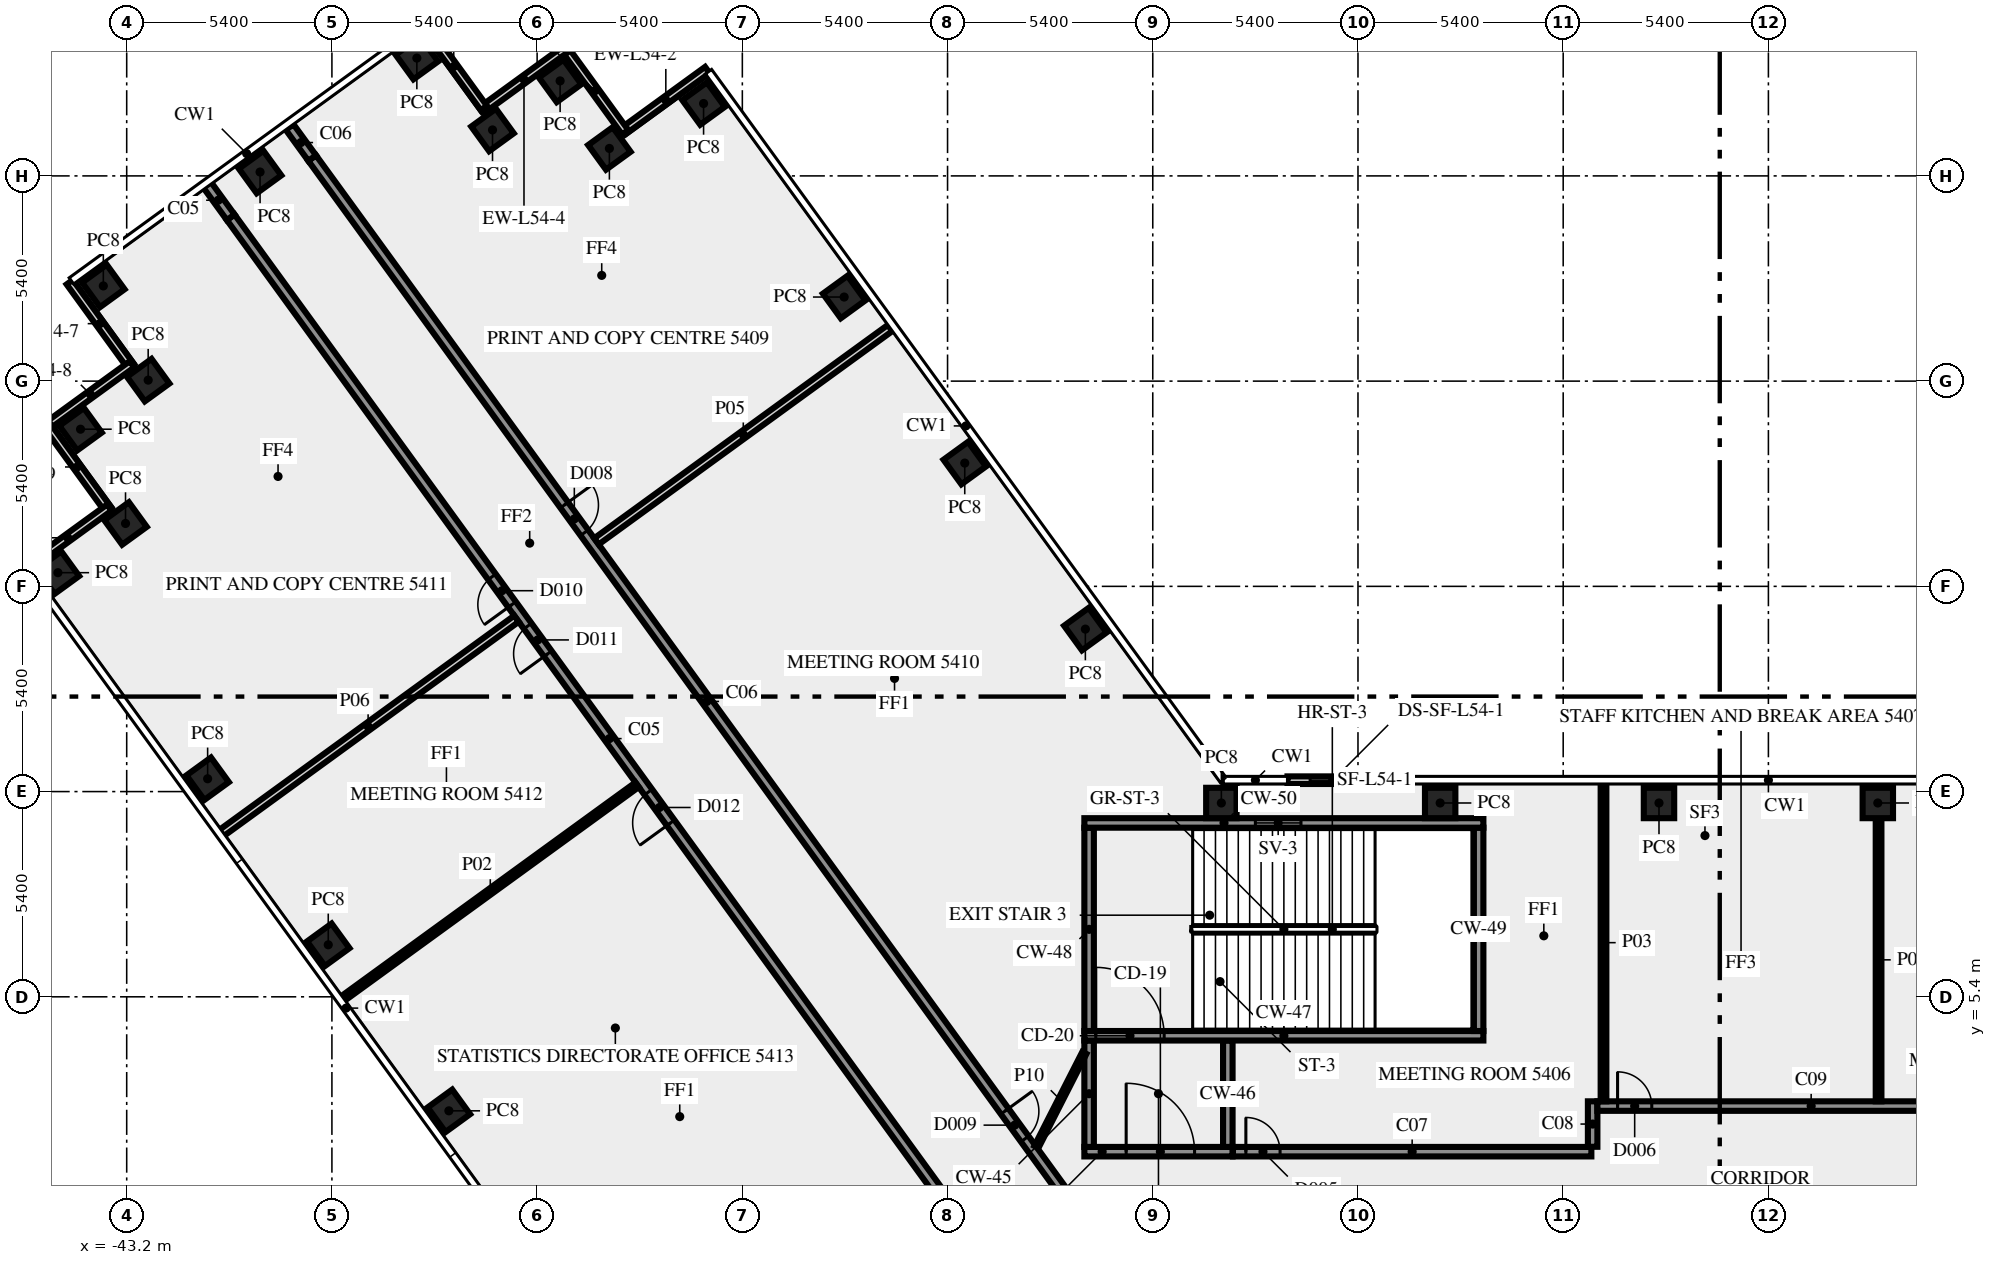
"""IFC4 building model, lengths in metres.
Left out: names, types, materials, properties, quantities, classifications, styles, units other than length and angle.
Written with IfcOpenShell. Run it as: python <this file> out.ifc"""

import sys

from ifc_helpers import new_model, si_unit, direction, frame, frame_2d, origin, origin_2d, place, context, subcontext, project, spatial, rectangle, extrude, element, fill, save


model = new_model("IFC4")
c1 = context("Model", 3, precision=1e-05, world=origin(), true_north=direction((0.0, 1.0)))
c2 = subcontext(c1, "Body", "Model", "MODEL_VIEW")
j1 = project(units=[si_unit("LENGTHUNIT", "METRE"), si_unit("PLANEANGLEUNIT", "RADIAN")], contexts=[c1])
p1 = place(None, origin())
s1 = spatial("IfcSite", under=j1, at=p1, CompositionType="ELEMENT")
p2 = place(p1, origin())
s2 = spatial("IfcBuilding", under=s1, at=p2, CompositionType="ELEMENT")
p3 = place(p2, frame((0.0, 0.0, 230.0)))
s3 = spatial("IfcBuildingStorey", under=s2, at=p3, CompositionType="ELEMENT", Elevation=230.0)
for number, where, z_axis, x_axis in (
    (1, (-17.974, 15.075, 0.0), (0.0, 0.0, 1.0), (-0.588, 0.809, 0.0)),
    (2, (-21.147, 19.444, 0.0), (0.0, 0.0, 1.0), (-0.588, 0.809, 0.0)),
    (3, (-24.321, 23.812, 0.0), (0.0, 0.0, 1.0), (-0.588, 0.809, 0.0)),
    (4, (-28.02, 28.905, 0.0), (0.0, 0.0, 1.0), (-0.809, -0.588, 0.0)),
    (5, (-30.499, 27.723, 0.0), (0.0, 0.0, 1.0), (-0.809, -0.588, 0.0)),
    (6, (-31.795, 29.5, 0.0), (0.0, 0.0, 1.0), (-0.588, 0.809, 0.0)),
    (7, (-33.574, 28.209, 0.0), (0.0, 0.0, 1.0), (-0.588, 0.809, 0.0)),
    (8, (-35.565, 30.1, 0.0), (0.0, 0.0, 1.0), (-0.809, -0.588, 0.0)),
    (9, (-39.691, 27.102, 0.0), (0.0, 0.0, 1.0), (-0.809, -0.588, 0.0)),
    (10, (-43.815, 24.105, 0.0), (0.0, 0.0, 1.0), (-0.809, -0.588, 0.0)),
    (11, (-42.635, 21.626, 0.0), (0.0, 0.0, 1.0), (-0.809, -0.588, 0.0)),
    (12, (-44.415, 20.335, 0.0), (0.0, 0.0, 1.0), (0.588, -0.809, 0.0)),
    (13, (-43.231, 17.854, 0.0), (0.0, 0.0, 1.0), (0.588, -0.809, 0.0)),
    (14, (-45.01, 16.56, 0.0), (0.0, 0.0, 1.0), (0.588, -0.809, 0.0)),
    (15, (-41.07, 11.137, 0.0), (0.0, 0.0, 1.0), (0.588, -0.809, 0.0)),
    (16, (-37.896, 6.769, 0.0), (0.0, 0.0, 1.0), (0.588, -0.809, 0.0)),
    (17, (-34.722, 2.4, 0.0), (0.0, 0.0, 1.0), (0.588, -0.809, 0.0)),
    (18, (2.879, 10.5, 0.0), (0.0, 0.0, 1.0), (-1.0, 0.0, 0.0)),
    (19, (-2.879, 10.5, 0.0), (0.0, 0.0, 1.0), (-1.0, 0.0, 0.0)),
    (20, (-8.637, 10.5, 0.0), (0.0, 0.0, 1.0), (-1.0, 0.0, 0.0)),
    (21, (-14.395, 10.5, 0.0), (0.0, 0.0, 1.0), (-1.0, 0.0, 0.0)),
):
    element("IfcColumn", number, at=place(p3, frame(where, z_axis=z_axis, x_axis=x_axis)), inside=s3, PredefinedType="COLUMN", context=c2, shape_type="SweptSolid", body=[
        extrude(rectangle(XDim=0.8, YDim=0.8, at=origin_2d()), origin(), (0.0, 0.0, 1.0), 3.65),
    ])
for number, where, z_axis, x_axis in (
    (22, (-27.921, 29.787, 0.0), (0.0, 0.0, 1.0), (-0.809, -0.588, 0.0)),
    (23, (-30.083, 28.149, 0.0), (0.0, 0.0, 1.0), (-0.588, 0.809, 0.0)),
    (24, (-31.654, 30.331, 0.0), (0.0, 0.0, 1.0), (-0.809, -0.588, 0.0)),
    (25, (-33.801, 28.786, 0.0), (0.0, 0.0, 1.0), (-0.588, 0.809, 0.0)),
    (26, (-44.699, 24.205, 0.0), (0.0, 0.0, 1.0), (0.588, -0.809, 0.0)),
    (27, (-43.061, 22.043, 0.0), (0.0, 0.0, 1.0), (-0.809, -0.588, 0.0)),
    (28, (-45.296, 20.434, 0.0), (0.0, 0.0, 1.0), (0.588, -0.809, 0.0)),
    (29, (-43.658, 18.272, 0.0), (0.0, 0.0, 1.0), (-0.809, -0.588, 0.0)),
):
    element("IfcWall", number, at=place(p3, frame(where, z_axis=z_axis, x_axis=x_axis)), inside=s3, PredefinedType="SOLIDWALL", context=c2, shape_type="SweptSolid", body=[
        extrude(rectangle(XDim=2.7, YDim=0.2, at=frame_2d((1.35, 0.0))), origin(), (0.0, 0.0, 1.0), 3.65),
    ])
p4 = place(p3, frame((-10.263, 11.1, 0.0), z_axis=(0.0, 0.0, 1.0), x_axis=(-1.0, 0.0, 0.0)))
e30 = element("IfcWall", 30, at=p4, inside=s3, PredefinedType="SOLIDWALL", context=c2, shape_type="SweptSolid", body=[
    extrude(rectangle(XDim=2.392, YDim=0.2, at=frame_2d((1.196, 0.0))), origin(), (0.0, 0.0, 1.0), 3.65),
])
p5 = place(p4, frame((0.596, 0.0, 1.0)))
e31 = element("IfcOpeningElement", 31, at=p5, cuts=e30, PredefinedType="OPENING", context=c2, shape_type="SweptSolid", body=[
    extrude(rectangle(XDim=1.2, YDim=1.2, at=frame_2d((0.6, 0.6))), frame((0.0, 0.11, 0.0), z_axis=(0.0, -1.0, 0.0), x_axis=(1.0, 0.0, 0.0)), (0.0, 0.0, 1.0), 0.22),
])
p6 = place(p3, frame((-18.0, 1.325, 0.0), z_axis=(0.0, 0.0, 1.0), x_axis=(1.0, 0.0, 0.0)))
e32 = element("IfcWall", 32, at=p6, inside=s3, PredefinedType="SHEAR", context=c2, shape_type="SweptSolid", body=[
    extrude(rectangle(XDim=3.9, YDim=0.25, at=frame_2d((1.95, 0.0))), origin(), (0.0, 0.0, 1.0), 3.65),
])
p7 = place(p6, frame((1.1, 0.0, 0.0)))
e33 = element("IfcOpeningElement", 33, at=p7, cuts=e32, PredefinedType="OPENING", context=c2, shape_type="SweptSolid", body=[
    extrude(rectangle(XDim=1.8, YDim=2.1, at=frame_2d((0.9, 1.05))), frame((0.0, 0.135, 0.0), z_axis=(0.0, -1.0, 0.0), x_axis=(1.0, 0.0, 0.0)), (0.0, 0.0, 1.0), 0.27),
])
for number, where, z_axis, x_axis in (
    (34, (-17.875, 1.45, 0.0), (0.0, 0.0, 1.0), (0.0, 1.0, 0.0)),
    (35, (-14.225, 1.45, 0.0), (0.0, 0.0, 1.0), (0.0, 1.0, 0.0)),
):
    element("IfcWall", number, at=place(p3, frame(where, z_axis=z_axis, x_axis=x_axis)), inside=s3, PredefinedType="SHEAR", context=c2, shape_type="SweptSolid", body=[
        extrude(rectangle(XDim=2.8, YDim=0.25, at=frame_2d((1.4, 0.0))), origin(), (0.0, 0.0, 1.0), 3.65),
    ])
p8 = place(p3, frame((-18.0, 4.375, 0.0), z_axis=(0.0, 0.0, 1.0), x_axis=(1.0, 0.0, 0.0)))
e36 = element("IfcWall", 36, at=p8, inside=s3, PredefinedType="SHEAR", context=c2, shape_type="SweptSolid", body=[
    extrude(rectangle(XDim=10.5, YDim=0.25, at=frame_2d((5.25, 0.0))), origin(), (0.0, 0.0, 1.0), 3.65),
])
p9 = place(p8, frame((0.3, 0.0, 0.0)))
e37 = element("IfcOpeningElement", 37, at=p9, cuts=e36, PredefinedType="OPENING", context=c2, shape_type="SweptSolid", body=[
    extrude(rectangle(XDim=1.8, YDim=2.1, at=frame_2d((0.9, 1.05))), frame((0.0, 0.135, 0.0), z_axis=(0.0, -1.0, 0.0), x_axis=(1.0, 0.0, 0.0)), (0.0, 0.0, 1.0), 0.27),
])
for number, where, z_axis, x_axis in (
    (38, (-17.875, 4.5, 0.0), (0.0, 0.0, 1.0), (0.0, 1.0, 0.0)),
    (39, (-7.625, 4.5, 0.0), (0.0, 0.0, 1.0), (0.0, 1.0, 0.0)),
):
    element("IfcWall", number, at=place(p3, frame(where, z_axis=z_axis, x_axis=x_axis)), inside=s3, PredefinedType="SHEAR", context=c2, shape_type="SweptSolid", body=[
        extrude(rectangle(XDim=5.35, YDim=0.25, at=frame_2d((2.675, 0.0))), origin(), (0.0, 0.0, 1.0), 3.65),
    ])
p10 = place(p3, frame((-18.0, 9.975, 0.0), z_axis=(0.0, 0.0, 1.0), x_axis=(1.0, 0.0, 0.0)))
e40 = element("IfcWall", 40, at=p10, inside=s3, PredefinedType="SHEAR", context=c2, shape_type="SweptSolid", body=[
    extrude(rectangle(XDim=10.5, YDim=0.25, at=frame_2d((5.25, 0.0))), origin(), (0.0, 0.0, 1.0), 3.65),
])
p11 = place(p10, frame((4.5, 0.0, 1.0)))
e41 = element("IfcOpeningElement", 41, at=p11, cuts=e40, PredefinedType="OPENING", context=c2, shape_type="SweptSolid", body=[
    extrude(rectangle(XDim=1.2, YDim=1.2, at=frame_2d((0.6, 0.6))), frame((0.0, 0.135, 0.0), z_axis=(0.0, -1.0, 0.0), x_axis=(1.0, 0.0, 0.0)), (0.0, 0.0, 1.0), 0.27),
])
p12 = place(p3, frame((-20.531, -1.523, 0.0), z_axis=(0.0, 0.0, 1.0), x_axis=(-0.587781654618, 0.809019608226, 0.0)))
e42 = element("IfcWall", 42, at=p12, inside=s3, PredefinedType="SOLIDWALL", context=c2, shape_type="SweptSolid", body=[
    extrude(rectangle(XDim=33.911, YDim=0.25, at=frame_2d((16.956, 0.0))), origin(), (0.0, 0.0, 1.0), 3.65),
])
p13 = place(p12, frame((14.216, 0.0, 0.0)))
e43 = element("IfcOpeningElement", 43, at=p13, cuts=e42, PredefinedType="OPENING", context=c2, shape_type="SweptSolid", body=[
    extrude(rectangle(XDim=1.0, YDim=2.1, at=frame_2d((0.5, 1.05))), frame((0.0, 0.135, 0.0), z_axis=(0.0, -1.0, 0.0), x_axis=(1.0, 0.0, 0.0)), (0.0, 0.0, 1.0), 0.27),
])
p14 = place(p12, frame((19.715, 0.0, 0.0)))
e44 = element("IfcOpeningElement", 44, at=p14, cuts=e42, PredefinedType="OPENING", context=c2, shape_type="SweptSolid", body=[
    extrude(rectangle(XDim=0.9, YDim=2.1, at=frame_2d((0.45, 1.05))), frame((0.0, 0.135, 0.0), z_axis=(0.0, -1.0, 0.0), x_axis=(1.0, 0.0, 0.0)), (0.0, 0.0, 1.0), 0.27),
])
p15 = place(p12, frame((21.316, 0.0, 0.0)))
e45 = element("IfcOpeningElement", 45, at=p15, cuts=e42, PredefinedType="OPENING", context=c2, shape_type="SweptSolid", body=[
    extrude(rectangle(XDim=0.9, YDim=2.1, at=frame_2d((0.45, 1.05))), frame((0.0, 0.135, 0.0), z_axis=(0.0, -1.0, 0.0), x_axis=(1.0, 0.0, 0.0)), (0.0, 0.0, 1.0), 0.27),
])
p16 = place(p3, frame((-38.32, 27.469, 0.0), z_axis=(0.0, 0.0, 1.0), x_axis=(0.587788021768, -0.809014982226, 0.0)))
e46 = element("IfcWall", 46, at=p16, inside=s3, PredefinedType="SOLIDWALL", context=c2, shape_type="SweptSolid", body=[
    extrude(rectangle(XDim=35.344, YDim=0.25, at=frame_2d((17.672, 0.0))), origin(), (0.0, 0.0, 1.0), 3.65),
])
p17 = place(p16, frame((31.003, 0.0, 0.0)))
e47 = element("IfcOpeningElement", 47, at=p17, cuts=e46, PredefinedType="OPENING", context=c2, shape_type="SweptSolid", body=[
    extrude(rectangle(XDim=0.9, YDim=2.1, at=frame_2d((0.45, 1.05))), frame((0.0, 0.135, 0.0), z_axis=(0.0, -1.0, 0.0), x_axis=(1.0, 0.0, 0.0)), (0.0, 0.0, 1.0), 0.27),
])
p18 = place(p16, frame((11.286, 0.0, 0.0)))
e48 = element("IfcOpeningElement", 48, at=p18, cuts=e46, PredefinedType="OPENING", context=c2, shape_type="SweptSolid", body=[
    extrude(rectangle(XDim=0.9, YDim=2.1, at=frame_2d((0.45, 1.05))), frame((0.0, 0.135, 0.0), z_axis=(0.0, -1.0, 0.0), x_axis=(1.0, 0.0, 0.0)), (0.0, 0.0, 1.0), 0.27),
])
p19 = place(p3, frame((-14.09, 1.325, 0.0), z_axis=(0.0, 0.0, 1.0), x_axis=(1.0, 0.0, 0.0)))
e49 = element("IfcWall", 49, at=p19, inside=s3, PredefinedType="SOLIDWALL", context=c2, shape_type="SweptSolid", body=[
    extrude(rectangle(XDim=9.431, YDim=0.25, at=frame_2d((4.716, 0.0))), origin(), (0.0, 0.0, 1.0), 3.65),
])
p20 = place(p19, frame((0.34, 0.0, 0.0)))
e50 = element("IfcOpeningElement", 50, at=p20, cuts=e49, PredefinedType="OPENING", context=c2, shape_type="SweptSolid", body=[
    extrude(rectangle(XDim=0.9, YDim=2.1, at=frame_2d((0.45, 1.05))), frame((0.0, 0.135, 0.0), z_axis=(0.0, -1.0, 0.0), x_axis=(1.0, 0.0, 0.0)), (0.0, 0.0, 1.0), 0.27),
])
p21 = place(p3, frame((-4.625, 1.454, 0.0), z_axis=(0.0, 0.0, 1.0), x_axis=(0.0, 1.0, 0.0)))
e51 = element("IfcWall", 51, at=p21, inside=s3, PredefinedType="SOLIDWALL", context=c2, shape_type="SweptSolid", body=[
    extrude(rectangle(XDim=1.196, YDim=0.25, at=frame_2d((0.598, 0.0))), origin(), (0.0, 0.0, 1.0), 3.65),
])
p22 = place(p3, frame((-4.5, 2.525, 0.0), z_axis=(0.0, 0.0, 1.0), x_axis=(1.0, 0.0, 0.0)))
e52 = element("IfcWall", 52, at=p22, inside=s3, PredefinedType="SOLIDWALL", context=c2, shape_type="SweptSolid", body=[
    extrude(rectangle(XDim=11.25, YDim=0.25, at=frame_2d((5.625, 0.0))), origin(), (0.0, 0.0, 1.0), 3.65),
])
p23 = place(p22, frame((0.531, 0.0, 0.0)))
e53 = element("IfcOpeningElement", 53, at=p23, cuts=e52, PredefinedType="OPENING", context=c2, shape_type="SweptSolid", body=[
    extrude(rectangle(XDim=0.9, YDim=2.1, at=frame_2d((0.45, 1.05))), frame((0.0, 0.135, 0.0), z_axis=(0.0, -1.0, 0.0), x_axis=(1.0, 0.0, 0.0)), (0.0, 0.0, 1.0), 0.27),
])
p24 = place(p3, frame((-29.769, 10.98, 0.0), z_axis=(0.0, 0.0, 1.0), x_axis=(-0.809048817734, -0.587741448702, 0.0)))
e54 = element("IfcWall", 54, at=p24, inside=s3, PredefinedType="PARTITIONING", context=c2, shape_type="SweptSolid", body=[
    extrude(rectangle(XDim=9.55, YDim=0.15, at=frame_2d((4.775, 0.0))), origin(), (0.0, 0.0, 1.0), 2.85),
])
p25 = place(p3, frame((-4.339, 2.65, 0.0), z_axis=(0.0, 0.0, 1.0), x_axis=(0.0, 1.0, 0.0)))
e55 = element("IfcWall", 55, at=p25, inside=s3, PredefinedType="PARTITIONING", context=c2, shape_type="SweptSolid", body=[
    extrude(rectangle(XDim=8.35, YDim=0.15, at=frame_2d((4.175, 0.0))), origin(), (0.0, 0.0, 1.0), 2.85),
])
p26 = place(p3, frame((2.899, 10.095, 0.0), z_axis=(0.0, 0.0, 1.0), x_axis=(0.0, -1.0, 0.0)))
e56 = element("IfcWall", 56, at=p26, inside=s3, PredefinedType="PARTITIONING", context=c2, shape_type="SweptSolid", body=[
    extrude(rectangle(XDim=7.445, YDim=0.15, at=frame_2d((3.723, 0.0))), origin(), (0.0, 0.0, 1.0), 3.65),
])
p27 = place(p3, frame((-23.112, 22.998, 0.0), z_axis=(0.0, 0.0, 1.0), x_axis=(-0.809043311713, -0.587749027879, 0.0)))
e57 = element("IfcWall", 57, at=p27, inside=s3, PredefinedType="SOLIDWALL", context=c2, shape_type="SweptSolid", body=[
    extrude(rectangle(XDim=9.55, YDim=0.2, at=frame_2d((4.775, 0.0))), origin(), (0.0, 0.0, 1.0), 2.85),
])
p28 = place(p3, frame((-32.943, 15.349, 0.0), z_axis=(0.0, 0.0, 1.0), x_axis=(-0.80903787798, -0.587756507402, 0.0)))
e58 = element("IfcWall", 58, at=p28, inside=s3, PredefinedType="SOLIDWALL", context=c2, shape_type="SweptSolid", body=[
    extrude(rectangle(XDim=9.652, YDim=0.2, at=frame_2d((4.826, 0.0))), origin(), (0.0, 0.0, 1.0), 2.85),
])
p29 = place(p3, frame((-19.261, 1.45, 0.0), z_axis=(0.0, 0.0, 1.0), x_axis=(0.453950796792, 0.891026752736, 0.0)))
e59 = element("IfcWall", 59, at=p29, inside=s3, PredefinedType="PARTITIONING", context=c2, shape_type="SweptSolid", body=[
    extrude(rectangle(XDim=2.778, YDim=0.12, at=frame_2d((1.389, 0.0))), origin(), (0.0, 0.0, 1.0), 3.65),
])
p30 = place(p3, frame((-40.463, 25.911, 0.0), z_axis=(0.0, 0.0, 1.0), x_axis=(-0.587792454268, 0.809011761785, 0.0)))
e60 = element("IfcWall", 60, at=p30, inside=s3, PredefinedType="SOLIDWALL", context=c2, shape_type="SweptSolid", body=[
    extrude(rectangle(XDim=1.11, YDim=0.25, at=frame_2d((0.555, 0.0))), origin(), (0.0, 0.0, 1.0), 2.85),
])
p31 = place(p3, frame((-38.32, 27.469, 0.0), z_axis=(0.0, 0.0, 1.0), x_axis=(-0.587811913486, 0.808997623213, 0.0)))
e61 = element("IfcWall", 61, at=p31, inside=s3, PredefinedType="SOLIDWALL", context=c2, shape_type="SweptSolid", body=[
    extrude(rectangle(XDim=1.009, YDim=0.25, at=frame_2d((0.504, 0.0))), origin(), (0.0, 0.0, 1.0), 2.85),
])
p32 = place(p5, origin())
e62 = element("IfcWindow", 62, at=p32, inside=s3, PartitioningType="SINGLE_PANEL", PredefinedType="WINDOW", context=c2, shape_type="SweptSolid", body=[
    extrude(rectangle(XDim=1.2, YDim=1.2, at=frame_2d((0.6, 0.6))), frame((0.0, 0.03, 0.0), z_axis=(0.0, -1.0, 0.0), x_axis=(1.0, 0.0, 0.0)), (0.0, 0.0, 1.0), 0.06),
])
fill(e31, e62)
p33 = place(p7, origin())
e63 = element("IfcDoor", 63, at=p33, inside=s3, OperationType="DOUBLE_DOOR_SINGLE_SWING", PredefinedType="DOOR", context=c2, shape_type="SweptSolid", body=[
    extrude(rectangle(XDim=1.8, YDim=2.1, at=frame_2d((0.9, 1.05))), frame((0.0, 0.025, 0.0), z_axis=(0.0, -1.0, 0.0), x_axis=(1.0, 0.0, 0.0)), (0.0, 0.0, 1.0), 0.05),
])
fill(e33, e63)
p34 = place(p9, origin())
e64 = element("IfcDoor", 64, at=p34, inside=s3, OperationType="DOUBLE_DOOR_SINGLE_SWING", PredefinedType="DOOR", context=c2, shape_type="SweptSolid", body=[
    extrude(rectangle(XDim=1.8, YDim=2.1, at=frame_2d((0.9, 1.05))), frame((0.0, 0.025, 0.0), z_axis=(0.0, -1.0, 0.0), x_axis=(1.0, 0.0, 0.0)), (0.0, 0.0, 1.0), 0.05),
])
fill(e37, e64)
p35 = place(p11, origin())
e65 = element("IfcWindow", 65, at=p35, inside=s3, PartitioningType="SINGLE_PANEL", PredefinedType="WINDOW", context=c2, shape_type="SweptSolid", body=[
    extrude(rectangle(XDim=1.2, YDim=1.2, at=frame_2d((0.6, 0.6))), frame((0.0, 0.03, 0.0), z_axis=(0.0, -1.0, 0.0), x_axis=(1.0, 0.0, 0.0)), (0.0, 0.0, 1.0), 0.06),
])
fill(e41, e65)
p36 = place(p13, origin())
e66 = element("IfcDoor", 66, at=p36, inside=s3, OperationType="SINGLE_SWING_RIGHT", PredefinedType="DOOR", context=c2, shape_type="SweptSolid", body=[
    extrude(rectangle(XDim=1.0, YDim=2.1, at=frame_2d((0.5, 1.05))), frame((0.0, 0.025, 0.0), z_axis=(0.0, -1.0, 0.0), x_axis=(1.0, 0.0, 0.0)), (0.0, 0.0, 1.0), 0.05),
])
fill(e43, e66)
p37 = place(p20, origin())
e67 = element("IfcDoor", 67, at=p37, inside=s3, OperationType="SINGLE_SWING_LEFT", PredefinedType="DOOR", context=c2, shape_type="SweptSolid", body=[
    extrude(rectangle(XDim=0.9, YDim=2.1, at=frame_2d((0.45, 1.05))), frame((0.0, 0.025, 0.0), z_axis=(0.0, -1.0, 0.0), x_axis=(1.0, 0.0, 0.0)), (0.0, 0.0, 1.0), 0.05),
])
fill(e50, e67)
p38 = place(p17, origin())
e68 = element("IfcDoor", 68, at=p38, inside=s3, OperationType="SINGLE_SWING_RIGHT", PredefinedType="DOOR", context=c2, shape_type="SweptSolid", body=[
    extrude(rectangle(XDim=0.9, YDim=2.1, at=frame_2d((0.45, 1.05))), frame((0.0, 0.025, 0.0), z_axis=(0.0, -1.0, 0.0), x_axis=(1.0, 0.0, 0.0)), (0.0, 0.0, 1.0), 0.05),
])
fill(e47, e68)
p39 = place(p14, origin())
e69 = element("IfcDoor", 69, at=p39, inside=s3, OperationType="SINGLE_SWING_RIGHT", PredefinedType="DOOR", context=c2, shape_type="SweptSolid", body=[
    extrude(rectangle(XDim=0.9, YDim=2.1, at=frame_2d((0.45, 1.05))), frame((0.0, 0.025, 0.0), z_axis=(0.0, -1.0, 0.0), x_axis=(1.0, 0.0, 0.0)), (0.0, 0.0, 1.0), 0.05),
])
fill(e44, e69)
p40 = place(p18, origin())
e70 = element("IfcDoor", 70, at=p40, inside=s3, OperationType="SINGLE_SWING_RIGHT", PredefinedType="DOOR", context=c2, shape_type="SweptSolid", body=[
    extrude(rectangle(XDim=0.9, YDim=2.1, at=frame_2d((0.45, 1.05))), frame((0.0, 0.025, 0.0), z_axis=(0.0, -1.0, 0.0), x_axis=(1.0, 0.0, 0.0)), (0.0, 0.0, 1.0), 0.05),
])
fill(e48, e70)
p41 = place(p15, origin())
e71 = element("IfcDoor", 71, at=p41, inside=s3, OperationType="SINGLE_SWING_LEFT", PredefinedType="DOOR", context=c2, shape_type="SweptSolid", body=[
    extrude(rectangle(XDim=0.9, YDim=2.1, at=frame_2d((0.45, 1.05))), frame((0.0, 0.025, 0.0), z_axis=(0.0, -1.0, 0.0), x_axis=(1.0, 0.0, 0.0)), (0.0, 0.0, 1.0), 0.05),
])
fill(e45, e71)
p42 = place(p23, origin())
e72 = element("IfcDoor", 72, at=p42, inside=s3, OperationType="SINGLE_SWING_LEFT", PredefinedType="DOOR", context=c2, shape_type="SweptSolid", body=[
    extrude(rectangle(XDim=0.9, YDim=2.1, at=frame_2d((0.45, 1.05))), frame((0.0, 0.025, 0.0), z_axis=(0.0, -1.0, 0.0), x_axis=(1.0, 0.0, 0.0)), (0.0, 0.0, 1.0), 0.05),
])
fill(e53, e72)
save(model, sys.argv[1])
